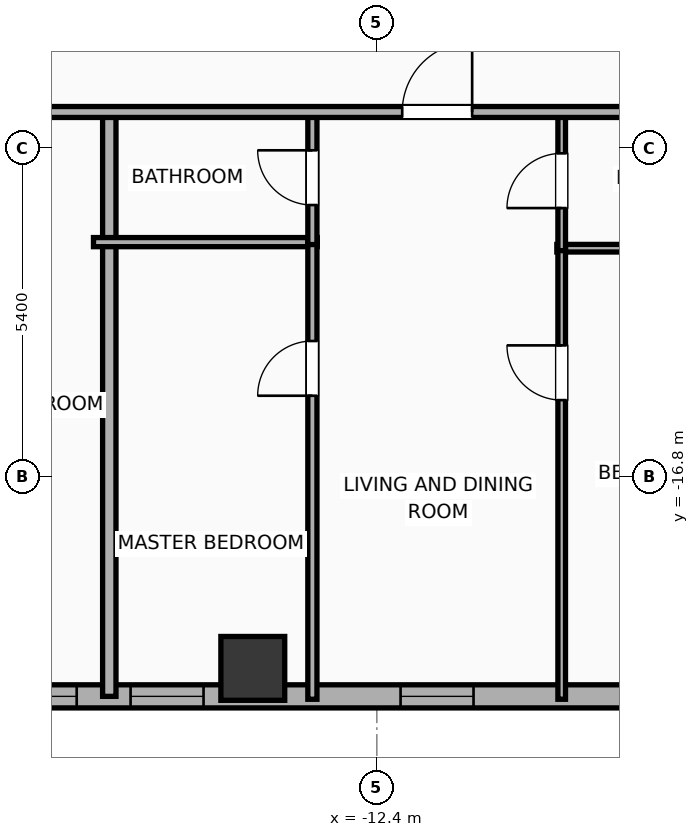
"""IFC4 building model, lengths in metres.
Left out: names, types, materials, properties, quantities, classifications, styles, units other than length and angle.
Written with IfcOpenShell. Run it as: python <this file> out.ifc"""

import sys

from ifc_helpers import new_model, si_unit, direction, frame, frame_2d, origin, origin_2d, place, context, subcontext, project, spatial, rectangle, hollow_rectangle, extrude, element, fill, save


model = new_model("IFC4")
c1 = context("Model", 3, precision=1e-05, world=origin(), true_north=direction((0.0, 1.0)))
c2 = subcontext(c1, "Body", "Model", "MODEL_VIEW")
j1 = project(units=[si_unit("LENGTHUNIT", "METRE"), si_unit("PLANEANGLEUNIT", "RADIAN")], contexts=[c1])
p1 = place(None, origin())
s1 = spatial("IfcSite", under=j1, at=p1, CompositionType="ELEMENT")
p2 = place(p1, origin())
s2 = spatial("IfcBuilding", under=s1, at=p2, CompositionType="ELEMENT")
p3 = place(p2, frame((0.0, 0.0, 132.6)))
s3 = spatial("IfcBuildingStorey", under=s2, at=p3, CompositionType="ELEMENT", Elevation=132.6)
p4 = place(p3, frame((-14.44, -19.95, 0.0), z_axis=(0.0, 0.0, 1.0), x_axis=(1.0, 0.0, 0.0)))
e1 = element("IfcColumn", 1, at=p4, inside=s3, PredefinedType="COLUMN", context=c2, shape_type="SweptSolid", body=[
    extrude(hollow_rectangle(XDim=1.05, YDim=1.05, WallThickness=0.036, at=origin_2d()), origin(), (0.0, 0.0, 1.0), 3.9),
])
p5 = place(p3, frame((29.381, -20.41, 0.0), z_axis=(0.0, 0.0, 1.0), x_axis=(-1.0, 0.0, 0.0)))
e2 = element("IfcWall", 2, at=p5, inside=s3, PredefinedType="ELEMENTEDWALL", context=c2, shape_type="SweptSolid", body=[
    extrude(rectangle(XDim=54.763, YDim=0.38, at=frame_2d((27.381, 0.0))), origin(), (0.0, 0.0, 1.0), 3.65),
])
p6 = place(p5, frame((3.995, 0.0, 0.75)))
e3 = element("IfcOpeningElement", 3, at=p6, cuts=e2, PredefinedType="OPENING", context=c2, shape_type="SweptSolid", body=[
    extrude(rectangle(XDim=2.4, YDim=2.1, at=frame_2d((1.2, 1.05))), frame((0.0, 0.2, 0.0), z_axis=(0.0, -1.0, 0.0), x_axis=(1.0, 0.0, 0.0)), (0.0, 0.0, 1.0), 0.4),
])
p7 = place(p5, frame((18.486, 0.0, 0.75)))
e4 = element("IfcOpeningElement", 4, at=p7, cuts=e2, PredefinedType="OPENING", context=c2, shape_type="SweptSolid", body=[
    extrude(rectangle(XDim=2.4, YDim=2.1, at=frame_2d((1.2, 1.05))), frame((0.0, 0.2, 0.0), z_axis=(0.0, -1.0, 0.0), x_axis=(1.0, 0.0, 0.0)), (0.0, 0.0, 1.0), 0.4),
])
p8 = place(p5, frame((46.717, 0.0, 0.75)))
e5 = element("IfcOpeningElement", 5, at=p8, cuts=e2, PredefinedType="OPENING", context=c2, shape_type="SweptSolid", body=[
    extrude(rectangle(XDim=2.4, YDim=2.1, at=frame_2d((1.2, 1.05))), frame((0.0, 0.2, 0.0), z_axis=(0.0, -1.0, 0.0), x_axis=(1.0, 0.0, 0.0)), (0.0, 0.0, 1.0), 0.4),
])
p9 = place(p5, frame((52.651, 0.0, 0.75)))
e6 = element("IfcOpeningElement", 6, at=p9, cuts=e2, PredefinedType="OPENING", context=c2, shape_type="SweptSolid", body=[
    extrude(rectangle(XDim=1.2, YDim=2.05, at=frame_2d((0.6, 1.025))), frame((0.0, 0.2, 0.0), z_axis=(0.0, -1.0, 0.0), x_axis=(1.0, 0.0, 0.0)), (0.0, 0.0, 1.0), 0.4),
])
p10 = place(p5, frame((50.521, 0.0, 0.75)))
e7 = element("IfcOpeningElement", 7, at=p10, cuts=e2, PredefinedType="OPENING", context=c2, shape_type="SweptSolid", body=[
    extrude(rectangle(XDim=1.2, YDim=2.05, at=frame_2d((0.6, 1.025))), frame((0.0, 0.2, 0.0), z_axis=(0.0, -1.0, 0.0), x_axis=(1.0, 0.0, 0.0)), (0.0, 0.0, 1.0), 0.4),
])
p11 = place(p5, frame((40.191, 0.0, 0.75)))
e8 = element("IfcOpeningElement", 8, at=p11, cuts=e2, PredefinedType="OPENING", context=c2, shape_type="SweptSolid", body=[
    extrude(rectangle(XDim=1.2, YDim=2.05, at=frame_2d((0.6, 1.025))), frame((0.0, 0.2, 0.0), z_axis=(0.0, -1.0, 0.0), x_axis=(1.0, 0.0, 0.0)), (0.0, 0.0, 1.0), 0.4),
])
p12 = place(p5, frame((44.631, 0.0, 0.75)))
e9 = element("IfcOpeningElement", 9, at=p12, cuts=e2, PredefinedType="OPENING", context=c2, shape_type="SweptSolid", body=[
    extrude(rectangle(XDim=1.2, YDim=2.05, at=frame_2d((0.6, 1.025))), frame((0.0, 0.2, 0.0), z_axis=(0.0, -1.0, 0.0), x_axis=(1.0, 0.0, 0.0)), (0.0, 0.0, 1.0), 0.4),
])
p13 = place(p5, frame((36.561, 0.0, 0.75)))
e10 = element("IfcOpeningElement", 10, at=p13, cuts=e2, PredefinedType="OPENING", context=c2, shape_type="SweptSolid", body=[
    extrude(rectangle(XDim=1.2, YDim=2.05, at=frame_2d((0.6, 1.025))), frame((0.0, 0.2, 0.0), z_axis=(0.0, -1.0, 0.0), x_axis=(1.0, 0.0, 0.0)), (0.0, 0.0, 1.0), 0.4),
])
p14 = place(p5, frame((30.004, 0.0, 0.75)))
e11 = element("IfcOpeningElement", 11, at=p14, cuts=e2, PredefinedType="OPENING", context=c2, shape_type="SweptSolid", body=[
    extrude(rectangle(XDim=1.2, YDim=2.05, at=frame_2d((0.6, 1.025))), frame((0.0, 0.2, 0.0), z_axis=(0.0, -1.0, 0.0), x_axis=(1.0, 0.0, 0.0)), (0.0, 0.0, 1.0), 0.4),
])
p15 = place(p5, frame((33.599, 0.0, 0.75)))
e12 = element("IfcOpeningElement", 12, at=p15, cuts=e2, PredefinedType="OPENING", context=c2, shape_type="SweptSolid", body=[
    extrude(rectangle(XDim=1.2, YDim=2.05, at=frame_2d((0.6, 1.025))), frame((0.0, 0.2, 0.0), z_axis=(0.0, -1.0, 0.0), x_axis=(1.0, 0.0, 0.0)), (0.0, 0.0, 1.0), 0.4),
])
p16 = place(p5, frame((26.086, 0.0, 0.75)))
e13 = element("IfcOpeningElement", 13, at=p16, cuts=e2, PredefinedType="OPENING", context=c2, shape_type="SweptSolid", body=[
    extrude(rectangle(XDim=1.2, YDim=2.05, at=frame_2d((0.6, 1.025))), frame((0.0, 0.2, 0.0), z_axis=(0.0, -1.0, 0.0), x_axis=(1.0, 0.0, 0.0)), (0.0, 0.0, 1.0), 0.4),
])
p17 = place(p5, frame((22.626, 0.0, 0.75)))
e14 = element("IfcOpeningElement", 14, at=p17, cuts=e2, PredefinedType="OPENING", context=c2, shape_type="SweptSolid", body=[
    extrude(rectangle(XDim=1.2, YDim=2.05, at=frame_2d((0.6, 1.025))), frame((0.0, 0.2, 0.0), z_axis=(0.0, -1.0, 0.0), x_axis=(1.0, 0.0, 0.0)), (0.0, 0.0, 1.0), 0.4),
])
p18 = place(p5, frame((15.361, 0.0, 0.75)))
e15 = element("IfcOpeningElement", 15, at=p18, cuts=e2, PredefinedType="OPENING", context=c2, shape_type="SweptSolid", body=[
    extrude(rectangle(XDim=1.2, YDim=2.05, at=frame_2d((0.6, 1.025))), frame((0.0, 0.2, 0.0), z_axis=(0.0, -1.0, 0.0), x_axis=(1.0, 0.0, 0.0)), (0.0, 0.0, 1.0), 0.4),
])
p19 = place(p5, frame((8.986, 0.0, 0.75)))
e16 = element("IfcOpeningElement", 16, at=p19, cuts=e2, PredefinedType="OPENING", context=c2, shape_type="SweptSolid", body=[
    extrude(rectangle(XDim=1.2, YDim=2.05, at=frame_2d((0.6, 1.025))), frame((0.0, 0.2, 0.0), z_axis=(0.0, -1.0, 0.0), x_axis=(1.0, 0.0, 0.0)), (0.0, 0.0, 1.0), 0.4),
])
p20 = place(p5, frame((1.736, 0.0, 0.75)))
e17 = element("IfcOpeningElement", 17, at=p20, cuts=e2, PredefinedType="OPENING", context=c2, shape_type="SweptSolid", body=[
    extrude(rectangle(XDim=1.2, YDim=2.05, at=frame_2d((0.6, 1.025))), frame((0.0, 0.2, 0.0), z_axis=(0.0, -1.0, 0.0), x_axis=(1.0, 0.0, 0.0)), (0.0, 0.0, 1.0), 0.4),
])
p21 = place(p3, frame((-16.8, -20.41, 0.0), z_axis=(0.0, 0.0, 1.0), x_axis=(0.0, 1.0, 0.0)))
e18 = element("IfcWall", 18, at=p21, inside=s3, PredefinedType="PARTITIONING", context=c2, shape_type="SweptSolid", body=[
    extrude(rectangle(XDim=9.69, YDim=0.22, at=frame_2d((4.845, 0.0))), origin(), (0.0, 0.0, 1.0), 3.65),
])
p22 = place(p3, frame((-17.06, -12.94, 0.0), z_axis=(0.0, 0.0, 1.0), x_axis=(1.0, 0.0, 0.0)))
e19 = element("IfcWall", 19, at=p22, inside=s3, PredefinedType="PLUMBINGWALL", context=c2, shape_type="SweptSolid", body=[
    extrude(rectangle(XDim=3.68, YDim=0.15, at=frame_2d((1.84, 0.0))), origin(), (0.0, 0.0, 1.0), 3.65),
])
p23 = place(p3, frame((-9.44, -13.04, 0.0), z_axis=(0.0, 0.0, 1.0), x_axis=(1.0, 0.0, 0.0)))
e20 = element("IfcWall", 20, at=p23, inside=s3, PredefinedType="PARTITIONING", context=c2, shape_type="SweptSolid", body=[
    extrude(rectangle(XDim=3.5, YDim=0.125, at=frame_2d((1.75, 0.0))), origin(), (0.0, 0.0, 1.0), 3.65),
])
p24 = place(p3, frame((-13.46, -20.458, 0.0), z_axis=(0.0, 0.0, 1.0), x_axis=(0.0, 1.0, 0.0)))
e21 = element("IfcWall", 21, at=p24, inside=s3, PredefinedType="PLUMBINGWALL", context=c2, shape_type="SweptSolid", body=[
    extrude(rectangle(XDim=7.558, YDim=0.15, at=frame_2d((3.779, 0.0))), origin(), (0.0, 0.0, 1.0), 3.65),
])
p25 = place(p24, frame((4.991, 0.0, 0.0)))
e22 = element("IfcOpeningElement", 22, at=p25, cuts=e21, PredefinedType="OPENING", context=c2, shape_type="SweptSolid", body=[
    extrude(rectangle(XDim=0.9, YDim=2.05, at=frame_2d((0.45, 1.025))), frame((0.0, 0.085, 0.0), z_axis=(0.0, -1.0, 0.0), x_axis=(1.0, 0.0, 0.0)), (0.0, 0.0, 1.0), 0.17),
])
p26 = place(p3, frame((-13.46, -12.98, 0.0), z_axis=(0.0, 0.0, 1.0), x_axis=(0.0, 1.0, 0.0)))
e23 = element("IfcWall", 23, at=p26, inside=s3, PredefinedType="PLUMBINGWALL", context=c2, shape_type="SweptSolid", body=[
    extrude(rectangle(XDim=2.2, YDim=0.15, at=frame_2d((1.1, 0.0))), origin(), (0.0, 0.0, 1.0), 3.65),
])
p27 = place(p26, frame((0.65, 0.0, 0.0)))
e24 = element("IfcOpeningElement", 24, at=p27, cuts=e23, PredefinedType="OPENING", context=c2, shape_type="SweptSolid", body=[
    extrude(rectangle(XDim=0.9, YDim=2.05, at=frame_2d((0.45, 1.025))), frame((0.0, 0.085, 0.0), z_axis=(0.0, -1.0, 0.0), x_axis=(1.0, 0.0, 0.0)), (0.0, 0.0, 1.0), 0.17),
])
p28 = place(p3, frame((-9.36, -20.458, 0.0), z_axis=(0.0, 0.0, 1.0), x_axis=(0.0, 1.0, 0.0)))
e25 = element("IfcWall", 25, at=p28, inside=s3, PredefinedType="PARTITIONING", context=c2, shape_type="SweptSolid", body=[
    extrude(rectangle(XDim=7.458, YDim=0.125, at=frame_2d((3.729, 0.0))), origin(), (0.0, 0.0, 1.0), 3.65),
])
p29 = place(p28, frame((4.919, 0.0, 0.0)))
e26 = element("IfcOpeningElement", 26, at=p29, cuts=e25, PredefinedType="OPENING", context=c2, shape_type="SweptSolid", body=[
    extrude(rectangle(XDim=0.9, YDim=2.05, at=frame_2d((0.45, 1.025))), frame((0.0, 0.073, 0.0), z_axis=(0.0, -1.0, 0.0), x_axis=(1.0, 0.0, 0.0)), (0.0, 0.0, 1.0), 0.145),
])
p30 = place(p3, frame((-9.36, -13.08, 0.0), z_axis=(0.0, 0.0, 1.0), x_axis=(0.0, 1.0, 0.0)))
e27 = element("IfcWall", 27, at=p30, inside=s3, PredefinedType="PARTITIONING", context=c2, shape_type="SweptSolid", body=[
    extrude(rectangle(XDim=2.3, YDim=0.125, at=frame_2d((1.15, 0.0))), origin(), (0.0, 0.0, 1.0), 3.65),
])
p31 = place(p30, frame((0.7, 0.0, 0.0)))
e28 = element("IfcOpeningElement", 28, at=p31, cuts=e27, PredefinedType="OPENING", context=c2, shape_type="SweptSolid", body=[
    extrude(rectangle(XDim=0.9, YDim=2.05, at=frame_2d((0.45, 1.025))), frame((0.0, 0.073, 0.0), z_axis=(0.0, -1.0, 0.0), x_axis=(1.0, 0.0, 0.0)), (0.0, 0.0, 1.0), 0.145),
])
p32 = place(p3, frame((-29.21, -10.8, 0.0), z_axis=(0.0, 0.0, 1.0), x_axis=(1.0, 0.0, 0.0)))
e29 = element("IfcWall", 29, at=p32, inside=s3, PredefinedType="PARTITIONING", context=c2, shape_type="SweptSolid", body=[
    extrude(rectangle(XDim=62.42, YDim=0.18, at=frame_2d((31.21, 0.0))), origin(), (0.0, 0.0, 1.0), 3.65),
])
p33 = place(p32, frame((2.74, 0.0, 0.0)))
e30 = element("IfcOpeningElement", 30, at=p33, cuts=e29, PredefinedType="OPENING", context=c2, shape_type="SweptSolid", body=[
    extrude(rectangle(XDim=0.9, YDim=2.05, at=frame_2d((0.45, 1.025))), frame((0.0, 0.1, 0.0), z_axis=(0.0, -1.0, 0.0), x_axis=(1.0, 0.0, 0.0)), (0.0, 0.0, 1.0), 0.2),
])
p34 = place(p32, frame((9.968, 0.0, 0.0)))
e31 = element("IfcOpeningElement", 31, at=p34, cuts=e29, PredefinedType="OPENING", context=c2, shape_type="SweptSolid", body=[
    extrude(rectangle(XDim=1.15, YDim=2.05, at=frame_2d((0.575, 1.025))), frame((0.0, 0.1, 0.0), z_axis=(0.0, -1.0, 0.0), x_axis=(1.0, 0.0, 0.0)), (0.0, 0.0, 1.0), 0.2),
])
p35 = place(p32, frame((17.227, 0.0, 0.0)))
e32 = element("IfcOpeningElement", 32, at=p35, cuts=e29, PredefinedType="OPENING", context=c2, shape_type="SweptSolid", body=[
    extrude(rectangle(XDim=1.15, YDim=2.05, at=frame_2d((0.575, 1.025))), frame((0.0, 0.1, 0.0), z_axis=(0.0, -1.0, 0.0), x_axis=(1.0, 0.0, 0.0)), (0.0, 0.0, 1.0), 0.2),
])
p36 = place(p32, frame((28.157, 0.0, 0.0)))
e33 = element("IfcOpeningElement", 33, at=p36, cuts=e29, PredefinedType="OPENING", context=c2, shape_type="SweptSolid", body=[
    extrude(rectangle(XDim=1.15, YDim=2.05, at=frame_2d((0.575, 1.025))), frame((0.0, 0.1, 0.0), z_axis=(0.0, -1.0, 0.0), x_axis=(1.0, 0.0, 0.0)), (0.0, 0.0, 1.0), 0.2),
])
p37 = place(p32, frame((38.512, 0.0, 0.0)))
e34 = element("IfcOpeningElement", 34, at=p37, cuts=e29, PredefinedType="OPENING", context=c2, shape_type="SweptSolid", body=[
    extrude(rectangle(XDim=1.15, YDim=2.05, at=frame_2d((0.575, 1.025))), frame((0.0, 0.1, 0.0), z_axis=(0.0, -1.0, 0.0), x_axis=(1.0, 0.0, 0.0)), (0.0, 0.0, 1.0), 0.2),
])
p38 = place(p32, frame((49.33, 0.0, 0.0)))
e35 = element("IfcOpeningElement", 35, at=p38, cuts=e29, PredefinedType="OPENING", context=c2, shape_type="SweptSolid", body=[
    extrude(rectangle(XDim=1.15, YDim=2.05, at=frame_2d((0.575, 1.025))), frame((0.0, 0.1, 0.0), z_axis=(0.0, -1.0, 0.0), x_axis=(1.0, 0.0, 0.0)), (0.0, 0.0, 1.0), 0.2),
])
p39 = place(p32, frame((58.237, 0.0, 0.0)))
e36 = element("IfcOpeningElement", 36, at=p39, cuts=e29, PredefinedType="OPENING", context=c2, shape_type="SweptSolid", body=[
    extrude(rectangle(XDim=1.15, YDim=2.05, at=frame_2d((0.575, 1.025))), frame((0.0, 0.1, 0.0), z_axis=(0.0, -1.0, 0.0), x_axis=(1.0, 0.0, 0.0)), (0.0, 0.0, 1.0), 0.2),
])
p40 = place(p8, origin())
e37 = element("IfcWindow", 37, at=p40, inside=s3, PartitioningType="SINGLE_PANEL", PredefinedType="WINDOW", context=c2, shape_type="SweptSolid", body=[
    extrude(rectangle(XDim=2.4, YDim=2.1, at=frame_2d((1.2, 1.05))), frame((0.0, 0.03, 0.0), z_axis=(0.0, -1.0, 0.0), x_axis=(1.0, 0.0, 0.0)), (0.0, 0.0, 1.0), 0.06),
])
fill(e5, e37)
p41 = place(p11, origin())
e38 = element("IfcWindow", 38, at=p41, inside=s3, PartitioningType="SINGLE_PANEL", PredefinedType="WINDOW", context=c2, shape_type="SweptSolid", body=[
    extrude(rectangle(XDim=1.2, YDim=2.05, at=frame_2d((0.6, 1.025))), frame((0.0, 0.03, 0.0), z_axis=(0.0, -1.0, 0.0), x_axis=(1.0, 0.0, 0.0)), (0.0, 0.0, 1.0), 0.06),
])
fill(e8, e38)
p42 = place(p12, origin())
e39 = element("IfcWindow", 39, at=p42, inside=s3, PartitioningType="SINGLE_PANEL", PredefinedType="WINDOW", context=c2, shape_type="SweptSolid", body=[
    extrude(rectangle(XDim=1.2, YDim=2.05, at=frame_2d((0.6, 1.025))), frame((0.0, 0.03, 0.0), z_axis=(0.0, -1.0, 0.0), x_axis=(1.0, 0.0, 0.0)), (0.0, 0.0, 1.0), 0.06),
])
fill(e9, e39)
p43 = place(p25, origin())
e40 = element("IfcDoor", 40, at=p43, inside=s3, OperationType="SINGLE_SWING_LEFT", PredefinedType="DOOR", context=c2, shape_type="SweptSolid", body=[
    extrude(rectangle(XDim=0.9, YDim=2.05, at=frame_2d((0.45, 1.025))), frame((0.0, 0.025, 0.0), z_axis=(0.0, -1.0, 0.0), x_axis=(1.0, 0.0, 0.0)), (0.0, 0.0, 1.0), 0.05),
])
fill(e22, e40)
p44 = place(p27, origin())
e41 = element("IfcDoor", 41, at=p44, inside=s3, OperationType="SINGLE_SWING_RIGHT", PredefinedType="DOOR", context=c2, shape_type="SweptSolid", body=[
    extrude(rectangle(XDim=0.9, YDim=2.05, at=frame_2d((0.45, 1.025))), frame((0.0, 0.025, 0.0), z_axis=(0.0, -1.0, 0.0), x_axis=(1.0, 0.0, 0.0)), (0.0, 0.0, 1.0), 0.05),
])
fill(e24, e41)
p45 = place(p29, origin())
e42 = element("IfcDoor", 42, at=p45, inside=s3, OperationType="SINGLE_SWING_RIGHT", PredefinedType="DOOR", context=c2, shape_type="SweptSolid", body=[
    extrude(rectangle(XDim=0.9, YDim=2.05, at=frame_2d((0.45, 1.025))), frame((0.0, 0.025, 0.0), z_axis=(0.0, -1.0, 0.0), x_axis=(1.0, 0.0, 0.0)), (0.0, 0.0, 1.0), 0.05),
])
fill(e26, e42)
p46 = place(p31, origin())
e43 = element("IfcDoor", 43, at=p46, inside=s3, OperationType="SINGLE_SWING_LEFT", PredefinedType="DOOR", context=c2, shape_type="SweptSolid", body=[
    extrude(rectangle(XDim=0.9, YDim=2.05, at=frame_2d((0.45, 1.025))), frame((0.0, 0.025, 0.0), z_axis=(0.0, -1.0, 0.0), x_axis=(1.0, 0.0, 0.0)), (0.0, 0.0, 1.0), 0.05),
])
fill(e28, e43)
p47 = place(p35, origin())
e44 = element("IfcDoor", 44, at=p47, inside=s3, OperationType="SINGLE_SWING_RIGHT", PredefinedType="DOOR", context=c2, shape_type="SweptSolid", body=[
    extrude(rectangle(XDim=1.15, YDim=2.05, at=frame_2d((0.575, 1.025))), frame((0.0, 0.025, 0.0), z_axis=(0.0, -1.0, 0.0), x_axis=(1.0, 0.0, 0.0)), (0.0, 0.0, 1.0), 0.05),
])
fill(e32, e44)
save(model, sys.argv[1])
